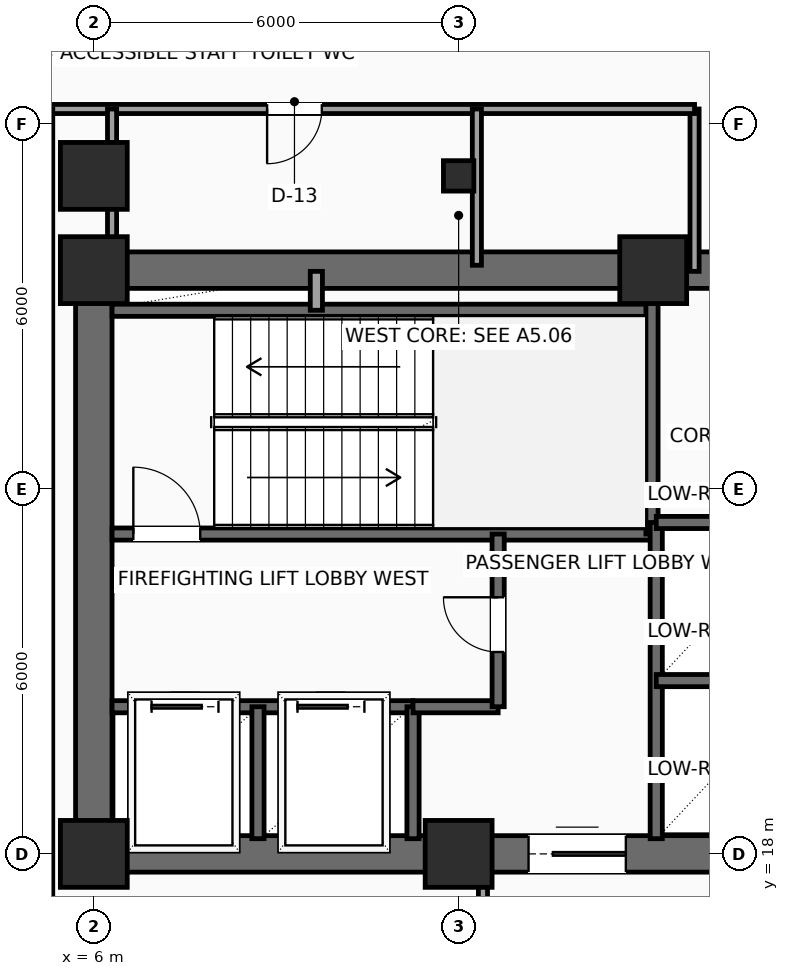
"""IFC4 building model, lengths in metres.
Left out: names, types, materials, properties, quantities, classifications, styles, units other than length and angle.
Written with IfcOpenShell. Run it as: python <this file> out.ifc"""

import sys

from ifc_helpers import new_model, si_unit, direction, frame, frame_2d, origin, origin_2d, place, context, subcontext, project, spatial, rectangle, hollow_rectangle, extrude, element, fill, save


model = new_model("IFC4")
c1 = context("Model", 3, precision=1e-05, world=origin(), true_north=direction((0.0, 1.0)))
c2 = subcontext(c1, "Body", "Model", "MODEL_VIEW")
j1 = project(units=[si_unit("LENGTHUNIT", "METRE"), si_unit("PLANEANGLEUNIT", "RADIAN")], contexts=[c1])
p1 = place(None, origin())
s1 = spatial("IfcSite", under=j1, at=p1, CompositionType="ELEMENT")
p2 = place(p1, origin())
s2 = spatial("IfcBuilding", under=s1, at=p2, CompositionType="ELEMENT")
p3 = place(p2, frame((0.0, 0.0, 103.35)))
s3 = spatial("IfcBuildingStorey", under=s2, at=p3, CompositionType="ELEMENT", Elevation=103.35)
for number, where, z_axis, x_axis in (
    (1, (6.0, 18.0, 0.0), (0.0, 0.0, 1.0), (1.0, 0.0, 0.0)),
    (2, (12.0, 18.0, 0.0), (0.0, 0.0, 1.0), (1.0, 0.0, 0.0)),
    (3, (6.0, 27.6, 0.0), (0.0, 0.0, 1.0), (1.0, 0.0, 0.0)),
    (4, (15.2, 27.6, 0.0), (0.0, 0.0, 1.0), (1.0, 0.0, 0.0)),
    (5, (6.0, 29.15, 0.0), (0.0, 0.0, 1.0), (1.0, 0.0, 0.0)),
):
    element("IfcColumn", number, at=place(p3, frame(where, z_axis=z_axis, x_axis=x_axis)), inside=s3, PredefinedType="COLUMN", context=c2, shape_type="SweptSolid", body=[
        extrude(rectangle(XDim=1.1, YDim=1.1, at=origin_2d()), origin(), (0.0, 0.0, 1.0), 3.75),
    ])
p4 = place(p3, frame((12.0, 29.15, 0.0), z_axis=(0.0, 0.0, 1.0), x_axis=(1.0, 0.0, 0.0)))
e6 = element("IfcColumn", 6, at=p4, inside=s3, PredefinedType="COLUMN", context=c2, shape_type="SweptSolid", body=[
    extrude(hollow_rectangle(XDim=0.5, YDim=0.5, WallThickness=0.025, InnerFilletRadius=0.025, OuterFilletRadius=0.04, at=origin_2d()), origin(), (0.0, 0.0, 1.0), 3.75),
])
p5 = place(p3, frame((6.0, 18.0, 0.0), z_axis=(0.0, 0.0, 1.0), x_axis=(1.0, 0.0, 0.0)))
e7 = element("IfcWall", 7, at=p5, inside=s3, PredefinedType="SHEAR", context=c2, shape_type="SweptSolid", body=[
    extrude(rectangle(XDim=12.0, YDim=0.6, at=frame_2d((6.0, 0.0))), origin(), (0.0, 0.0, 1.0), 3.525),
])
p6 = place(p5, frame((7.15, 0.0, 0.0)))
e8 = element("IfcOpeningElement", 8, at=p6, cuts=e7, PredefinedType="OPENING", context=c2, shape_type="SweptSolid", body=[
    extrude(rectangle(XDim=1.6, YDim=2.3, at=frame_2d((0.8, 1.15))), frame((0.0, 0.31, 0.0), z_axis=(0.0, -1.0, 0.0), x_axis=(1.0, 0.0, 0.0)), (0.0, 0.0, 1.0), 0.62),
])
p7 = place(p3, frame((6.0, 27.6, 0.0), z_axis=(0.0, 0.0, 1.0), x_axis=(1.0, 0.0, 0.0)))
e9 = element("IfcWall", 9, at=p7, inside=s3, PredefinedType="SHEAR", context=c2, shape_type="SweptSolid", body=[
    extrude(rectangle(XDim=12.0, YDim=0.6, at=frame_2d((6.0, 0.0))), origin(), (0.0, 0.0, 1.0), 3.525),
])
p8 = place(p7, frame((10.2, 0.0, 0.0)))
e10 = element("IfcOpeningElement", 10, at=p8, cuts=e9, PredefinedType="OPENING", context=c2, shape_type="SweptSolid", body=[
    extrude(rectangle(XDim=0.9, YDim=2.15, at=frame_2d((0.45, 1.075))), frame((0.0, 0.31, 0.0), z_axis=(0.0, -1.0, 0.0), x_axis=(1.0, 0.0, 0.0)), (0.0, 0.0, 1.0), 0.62),
])
p9 = place(p3, frame((6.0, 18.0, 0.0), z_axis=(0.0, 0.0, 1.0), x_axis=(0.0, 1.0, 0.0)))
e11 = element("IfcWall", 11, at=p9, inside=s3, PredefinedType="SHEAR", context=c2, shape_type="SweptSolid", body=[
    extrude(rectangle(XDim=9.6, YDim=0.6, at=frame_2d((4.8, 0.0))), origin(), (0.0, 0.0, 1.0), 3.525),
])
p10 = place(p3, frame((6.3, 23.26, 0.0), z_axis=(0.0, 0.0, 1.0), x_axis=(1.0, 0.0, 0.0)))
e12 = element("IfcWall", 12, at=p10, inside=s3, PredefinedType="SHEAR", context=c2, shape_type="SweptSolid", body=[
    extrude(rectangle(XDim=8.88, YDim=0.2, at=frame_2d((4.44, 0.0))), origin(), (0.0, 0.0, 1.0), 3.525),
])
p11 = place(p10, frame((0.35, 0.0, 0.0)))
e13 = element("IfcOpeningElement", 13, at=p11, cuts=e12, PredefinedType="OPENING", context=c2, shape_type="SweptSolid", body=[
    extrude(rectangle(XDim=1.1, YDim=2.2, at=frame_2d((0.55, 1.1))), frame((0.0, 0.11, 0.0), z_axis=(0.0, -1.0, 0.0), x_axis=(1.0, 0.0, 0.0)), (0.0, 0.0, 1.0), 0.22),
])
p12 = place(p3, frame((6.3, 26.94, 0.0), z_axis=(0.0, 0.0, 1.0), x_axis=(1.0, 0.0, 0.0)))
e14 = element("IfcWall", 14, at=p12, inside=s3, PredefinedType="SHEAR", context=c2, shape_type="SweptSolid", body=[
    extrude(rectangle(XDim=8.88, YDim=0.2, at=frame_2d((4.44, 0.0))), origin(), (0.0, 0.0, 1.0), 3.525),
])
p13 = place(p3, frame((15.18, 23.26, 0.0), z_axis=(0.0, 0.0, 1.0), x_axis=(0.0, 1.0, 0.0)))
e15 = element("IfcWall", 15, at=p13, inside=s3, PredefinedType="SHEAR", context=c2, shape_type="SweptSolid", body=[
    extrude(rectangle(XDim=4.04, YDim=0.2, at=frame_2d((2.02, 0.0))), origin(), (0.0, 0.0, 1.0), 3.525),
])
p14 = place(p3, frame((6.3, 20.42, 0.0), z_axis=(0.0, 0.0, 1.0), x_axis=(1.0, 0.0, 0.0)))
e16 = element("IfcWall", 16, at=p14, inside=s3, PredefinedType="SHEAR", context=c2, shape_type="SweptSolid", body=[
    extrude(rectangle(XDim=4.95, YDim=0.2, at=frame_2d((2.475, 0.0))), origin(), (0.0, 0.0, 1.0), 3.525),
])
p15 = place(p14, frame((0.65, 0.0, 0.0)))
e17 = element("IfcOpeningElement", 17, at=p15, cuts=e16, PredefinedType="OPENING", context=c2, shape_type="SweptSolid", body=[
    extrude(rectangle(XDim=1.1, YDim=2.2, at=frame_2d((0.55, 1.1))), frame((0.0, 0.11, 0.0), z_axis=(0.0, -1.0, 0.0), x_axis=(1.0, 0.0, 0.0)), (0.0, 0.0, 1.0), 0.22),
])
p16 = place(p14, frame((3.05, 0.0, 0.0)))
e18 = element("IfcOpeningElement", 18, at=p16, cuts=e16, PredefinedType="OPENING", context=c2, shape_type="SweptSolid", body=[
    extrude(rectangle(XDim=1.1, YDim=2.2, at=frame_2d((0.55, 1.1))), frame((0.0, 0.11, 0.0), z_axis=(0.0, -1.0, 0.0), x_axis=(1.0, 0.0, 0.0)), (0.0, 0.0, 1.0), 0.22),
])
for number, where, z_axis, x_axis in (
    (19, (8.7, 18.25, 0.0), (0.0, 0.0, 1.0), (0.0, 1.0, 0.0)),
    (20, (11.25, 18.25, 0.0), (0.0, 0.0, 1.0), (0.0, 1.0, 0.0)),
):
    element("IfcWall", number, at=place(p3, frame(where, z_axis=z_axis, x_axis=x_axis)), inside=s3, PredefinedType="SHEAR", context=c2, shape_type="SweptSolid", body=[
        extrude(rectangle(XDim=2.17, YDim=0.2, at=frame_2d((1.085, 0.0))), origin(), (0.0, 0.0, 1.0), 3.525),
    ])
p17 = place(p3, frame((11.25, 20.42, 0.0), z_axis=(0.0, 0.0, 1.0), x_axis=(1.0, 0.0, 0.0)))
e21 = element("IfcWall", 21, at=p17, inside=s3, PredefinedType="SHEAR", context=c2, shape_type="SweptSolid", body=[
    extrude(rectangle(XDim=1.4, YDim=0.2, at=frame_2d((0.7, 0.0))), origin(), (0.0, 0.0, 1.0), 3.525),
])
p18 = place(p3, frame((12.65, 20.42, 0.0), z_axis=(0.0, 0.0, 1.0), x_axis=(0.0, 1.0, 0.0)))
e22 = element("IfcWall", 22, at=p18, inside=s3, PredefinedType="SHEAR", context=c2, shape_type="SweptSolid", body=[
    extrude(rectangle(XDim=2.84, YDim=0.2, at=frame_2d((1.42, 0.0))), origin(), (0.0, 0.0, 1.0), 3.525),
])
p19 = place(p18, frame((0.9, 0.0, 0.0)))
e23 = element("IfcOpeningElement", 23, at=p19, cuts=e22, PredefinedType="OPENING", context=c2, shape_type="SweptSolid", body=[
    extrude(rectangle(XDim=0.9, YDim=2.15, at=frame_2d((0.45, 1.075))), frame((0.0, 0.11, 0.0), z_axis=(0.0, -1.0, 0.0), x_axis=(1.0, 0.0, 0.0)), (0.0, 0.0, 1.0), 0.22),
])
p20 = place(p3, frame((9.66, 26.94, 0.0), z_axis=(0.0, 0.0, 1.0), x_axis=(0.0, 1.0, 0.0)))
e24 = element("IfcWall", 24, at=p20, inside=s3, PredefinedType="SOLIDWALL", context=c2, shape_type="SweptSolid", body=[
    extrude(rectangle(XDim=0.64, YDim=0.2, at=frame_2d((0.32, 0.0))), origin(), (0.0, 0.0, 1.0), 3.525),
])
p21 = place(p3, frame((15.25, 18.25, 0.0), z_axis=(0.0, 0.0, 1.0), x_axis=(0.0, 1.0, 0.0)))
e25 = element("IfcWall", 25, at=p21, inside=s3, PredefinedType="SHEAR", context=c2, shape_type="SweptSolid", body=[
    extrude(rectangle(XDim=5.2, YDim=0.2, at=frame_2d((2.6, 0.0))), origin(), (0.0, 0.0, 1.0), 3.525),
])
p22 = place(p3, frame((15.25, 20.85, 0.0), z_axis=(0.0, 0.0, 1.0), x_axis=(1.0, 0.0, 0.0)))
e26 = element("IfcWall", 26, at=p22, inside=s3, PredefinedType="SHEAR", context=c2, shape_type="SweptSolid", body=[
    extrude(rectangle(XDim=2.4, YDim=0.2, at=frame_2d((1.2, 0.0))), origin(), (0.0, 0.0, 1.0), 3.525),
])
p23 = place(p3, frame((15.25, 23.45, 0.0), z_axis=(0.0, 0.0, 1.0), x_axis=(1.0, 0.0, 0.0)))
e27 = element("IfcWall", 27, at=p23, inside=s3, PredefinedType="SHEAR", context=c2, shape_type="SweptSolid", body=[
    extrude(rectangle(XDim=2.45, YDim=0.2, at=frame_2d((1.225, 0.0))), origin(), (0.0, 0.0, 1.0), 3.525),
])
p24 = place(p3, frame((15.88, 27.58, 0.0), z_axis=(0.0, 0.0, 1.0), x_axis=(0.0, 1.0, 0.0)))
e28 = element("IfcWall", 28, at=p24, inside=s3, PredefinedType="PARTITIONING", context=c2, shape_type="SweptSolid", body=[
    extrude(rectangle(XDim=2.67, YDim=0.15, at=frame_2d((1.335, 0.0))), origin(), (0.0, 0.0, 1.0), 3.525),
])
p25 = place(p3, frame((15.88, 30.25, 0.0), z_axis=(0.0, 0.0, 1.0), x_axis=(-1.0, 0.0, 0.0)))
e29 = element("IfcWall", 29, at=p25, inside=s3, PredefinedType="PARTITIONING", context=c2, shape_type="SweptSolid", body=[
    extrude(rectangle(XDim=10.63, YDim=0.15, at=frame_2d((5.315, 0.0))), origin(), (0.0, 0.0, 1.0), 3.525),
])
p26 = place(p25, frame((6.13, 0.0, 0.0)))
e30 = element("IfcOpeningElement", 30, at=p26, cuts=e29, PredefinedType="OPENING", context=c2, shape_type="SweptSolid", body=[
    extrude(rectangle(XDim=0.9, YDim=2.1, at=frame_2d((0.45, 1.05))), frame((0.0, 0.085, 0.0), z_axis=(0.0, -1.0, 0.0), x_axis=(1.0, 0.0, 0.0)), (0.0, 0.0, 1.0), 0.17),
])
p27 = place(p3, frame((5.25, 30.25, 0.0), z_axis=(0.0, 0.0, 1.0), x_axis=(0.0, -1.0, 0.0)))
e31 = element("IfcWall", 31, at=p27, inside=s3, PredefinedType="PARTITIONING", context=c2, shape_type="SweptSolid", body=[
    extrude(rectangle(XDim=13.1, YDim=0.15, at=frame_2d((6.55, 0.0))), origin(), (0.0, 0.0, 1.0), 3.525),
])
p28 = place(p3, frame((12.4, 17.15, 0.0), z_axis=(0.0, 0.0, 1.0), x_axis=(0.0, 1.0, 0.0)))
e32 = element("IfcWall", 32, at=p28, inside=s3, PredefinedType="PARTITIONING", context=c2, shape_type="SweptSolid", body=[
    extrude(rectangle(XDim=0.8, YDim=0.15, at=frame_2d((0.4, 0.0))), origin(), (0.0, 0.0, 1.0), 3.525),
])
for number, where, z_axis, x_axis in (
    (33, (6.3, 27.68, 0.0), (0.0, 0.0, 1.0), (0.0, 1.0, 0.0)),
    (34, (12.3, 27.68, 0.0), (0.0, 0.0, 1.0), (0.0, 1.0, 0.0)),
):
    element("IfcWall", number, at=place(p3, frame(where, z_axis=z_axis, x_axis=x_axis)), inside=s3, PredefinedType="PARTITIONING", context=c2, shape_type="SweptSolid", body=[
        extrude(rectangle(XDim=2.57, YDim=0.15, at=frame_2d((1.285, 0.0))), origin(), (0.0, 0.0, 1.0), 3.017),
    ])
p29 = place(p6, origin())
e35 = element("IfcDoor", 35, at=p29, inside=s3, OperationType="DOUBLE_DOOR_SLIDING", PredefinedType="DOOR", context=c2, shape_type="SweptSolid", body=[
    extrude(rectangle(XDim=1.6, YDim=2.3, at=frame_2d((0.8, 1.15))), frame((0.0, 0.025, 0.0), z_axis=(0.0, -1.0, 0.0), x_axis=(1.0, 0.0, 0.0)), (0.0, 0.0, 1.0), 0.05),
])
fill(e8, e35)
p30 = place(p11, origin())
e36 = element("IfcDoor", 36, at=p30, inside=s3, OperationType="SINGLE_SWING_LEFT", PredefinedType="DOOR", context=c2, shape_type="SweptSolid", body=[
    extrude(rectangle(XDim=1.1, YDim=2.2, at=frame_2d((0.55, 1.1))), frame((0.0, 0.025, 0.0), z_axis=(0.0, -1.0, 0.0), x_axis=(1.0, 0.0, 0.0)), (0.0, 0.0, 1.0), 0.05),
])
fill(e13, e36)
p31 = place(p15, origin())
e37 = element("IfcDoor", 37, at=p31, inside=s3, OperationType="SLIDING_TO_LEFT", PredefinedType="DOOR", context=c2, shape_type="SweptSolid", body=[
    extrude(rectangle(XDim=1.1, YDim=2.2, at=frame_2d((0.55, 1.1))), frame((0.0, 0.025, 0.0), z_axis=(0.0, -1.0, 0.0), x_axis=(1.0, 0.0, 0.0)), (0.0, 0.0, 1.0), 0.05),
])
fill(e17, e37)
p32 = place(p16, origin())
e38 = element("IfcDoor", 38, at=p32, inside=s3, OperationType="SLIDING_TO_LEFT", PredefinedType="DOOR", context=c2, shape_type="SweptSolid", body=[
    extrude(rectangle(XDim=1.1, YDim=2.2, at=frame_2d((0.55, 1.1))), frame((0.0, 0.025, 0.0), z_axis=(0.0, -1.0, 0.0), x_axis=(1.0, 0.0, 0.0)), (0.0, 0.0, 1.0), 0.05),
])
fill(e18, e38)
p33 = place(p19, origin())
e39 = element("IfcDoor", 39, at=p33, inside=s3, OperationType="SINGLE_SWING_RIGHT", PredefinedType="DOOR", context=c2, shape_type="SweptSolid", body=[
    extrude(rectangle(XDim=0.9, YDim=2.15, at=frame_2d((0.45, 1.075))), frame((0.0, 0.025, 0.0), z_axis=(0.0, -1.0, 0.0), x_axis=(1.0, 0.0, 0.0)), (0.0, 0.0, 1.0), 0.05),
])
fill(e23, e39)
p34 = place(p26, origin())
e40 = element("IfcDoor", 40, at=p34, inside=s3, OperationType="SINGLE_SWING_RIGHT", PredefinedType="DOOR", context=c2, shape_type="SweptSolid", body=[
    extrude(rectangle(XDim=0.9, YDim=2.1, at=frame_2d((0.45, 1.05))), frame((0.0, 0.025, 0.0), z_axis=(0.0, -1.0, 0.0), x_axis=(1.0, 0.0, 0.0)), (0.0, 0.0, 1.0), 0.05),
])
fill(e30, e40)
save(model, sys.argv[1])
